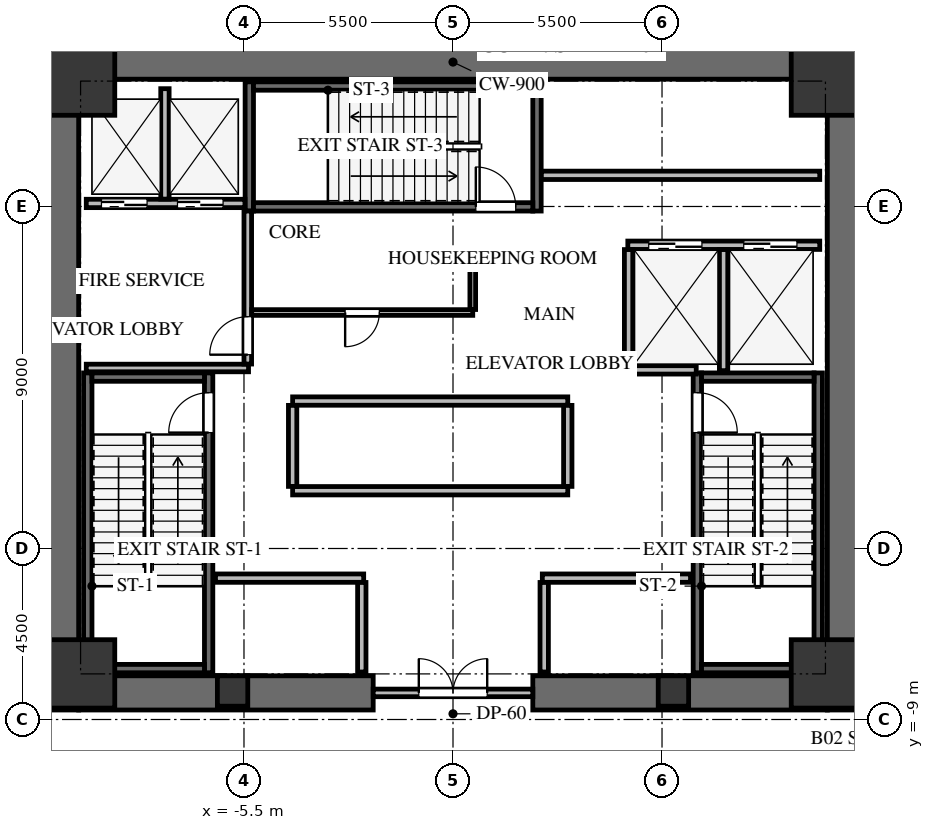
"""IFC4 building model, lengths in metres.
Left out: names, types, materials, properties, quantities, classifications, styles, units other than length and angle.
Written with IfcOpenShell. Run it as: python <this file> out.ifc"""

import sys

from ifc_helpers import new_model, si_unit, direction, frame, frame_2d, origin, origin_2d, place, context, subcontext, project, spatial, rectangle, extrude, source, transform, mapped, element, fill, save


model = new_model("IFC4")
c1 = context("Model", 3, precision=1e-05, world=origin(), true_north=direction((0.0, 1.0)))
c2 = subcontext(c1, "Body", "Model", "MODEL_VIEW")
j1 = project(units=[si_unit("LENGTHUNIT", "METRE"), si_unit("PLANEANGLEUNIT", "RADIAN")], contexts=[c1])
p1 = place(None, origin())
s1 = spatial("IfcSite", under=j1, at=p1, CompositionType="ELEMENT")
p2 = place(p1, origin())
s2 = spatial("IfcBuilding", under=s1, at=p2, CompositionType="ELEMENT")
p3 = place(p2, frame((0.0, 0.0, -10.0)))
s3 = spatial("IfcBuildingStorey", under=s2, at=p3, CompositionType="ELEMENT", Elevation=-10.0)
for number, where, z_axis, x_axis in (
    (1, (-10.3, -8.75, 0.0), (0.0, 0.0, 1.0), (0.0, 1.0, 0.0)),
    (2, (10.3, -8.75, 0.0), (0.0, 0.0, 1.0), (0.0, 1.0, 0.0)),
):
    element("IfcWall", number, at=place(p3, frame(where, z_axis=z_axis, x_axis=x_axis)), inside=s3, PredefinedType="SHEAR", context=c2, shape_type="SweptSolid", body=[
        extrude(rectangle(XDim=17.5, YDim=0.9, at=frame_2d((8.75, 0.0))), origin(), (0.0, 0.0, 1.0), 5.0),
    ])
for number, where, z_axis, x_axis in (
    (3, (-9.85, -8.3, 0.0), (0.0, 0.0, 1.0), (1.0, 0.0, 0.0)),
    (4, (2.1, -8.3, 0.0), (0.0, 0.0, 1.0), (1.0, 0.0, 0.0)),
):
    element("IfcWall", number, at=place(p3, frame(where, z_axis=z_axis, x_axis=x_axis)), inside=s3, PredefinedType="SHEAR", context=c2, shape_type="SweptSolid", body=[
        extrude(rectangle(XDim=7.75, YDim=0.9, at=frame_2d((3.875, 0.0))), origin(), (0.0, 0.0, 1.0), 5.0),
    ])
p4 = place(p3, frame((-9.85, 8.3, 0.0), z_axis=(0.0, 0.0, 1.0), x_axis=(1.0, 0.0, 0.0)))
e5 = element("IfcWall", 5, at=p4, inside=s3, PredefinedType="SHEAR", context=c2, shape_type="SweptSolid", body=[
    extrude(rectangle(XDim=19.7, YDim=0.9, at=frame_2d((9.85, 0.0))), origin(), (0.0, 0.0, 1.0), 5.0),
])
p5 = place(p3, frame((-6.43, -7.77, 0.0), z_axis=(0.0, 0.0, 1.0), x_axis=(0.0, 1.0, 0.0)))
e6 = element("IfcWall", 6, at=p5, inside=s3, PredefinedType="SHEAR", context=c2, shape_type="SweptSolid", body=[
    extrude(rectangle(XDim=7.89, YDim=0.22, at=frame_2d((3.945, 0.0))), origin(), (0.0, 0.0, 1.0), 4.65),
])
p6 = place(p5, frame((6.32, 0.0, 0.0)))
e7 = element("IfcOpeningElement", 7, at=p6, cuts=e6, PredefinedType="OPENING", context=c2, shape_type="SweptSolid", body=[
    extrude(rectangle(XDim=1.05, YDim=2.15, at=frame_2d((0.525, 1.075))), frame((0.0, 0.12, 0.0), z_axis=(0.0, -1.0, 0.0), x_axis=(1.0, 0.0, 0.0)), (0.0, 0.0, 1.0), 0.24),
])
p7 = place(p3, frame((-9.61, 0.12, 0.0), z_axis=(0.0, 0.0, 1.0), x_axis=(0.0, -1.0, 0.0)))
e8 = element("IfcWall", 8, at=p7, inside=s3, PredefinedType="SHEAR", context=c2, shape_type="SweptSolid", body=[
    extrude(rectangle(XDim=7.89, YDim=0.22, at=frame_2d((3.945, 0.0))), origin(), (0.0, 0.0, 1.0), 4.65),
])
for number, where, z_axis, x_axis in (
    (9, (-9.5, -7.66, 0.0), (0.0, 0.0, 1.0), (1.0, 0.0, 0.0)),
    (10, (-6.54, 0.01, 0.0), (0.0, 0.0, 1.0), (-1.0, 0.0, 0.0)),
):
    element("IfcWall", number, at=place(p3, frame(where, z_axis=z_axis, x_axis=x_axis)), inside=s3, PredefinedType="SHEAR", context=c2, shape_type="SweptSolid", body=[
        extrude(rectangle(XDim=2.96, YDim=0.22, at=frame_2d((1.48, 0.0))), origin(), (0.0, 0.0, 1.0), 4.65),
    ])
p8 = place(p3, frame((9.61, -7.77, 0.0), z_axis=(0.0, 0.0, 1.0), x_axis=(0.0, 1.0, 0.0)))
e11 = element("IfcWall", 11, at=p8, inside=s3, PredefinedType="SHEAR", context=c2, shape_type="SweptSolid", body=[
    extrude(rectangle(XDim=7.89, YDim=0.22, at=frame_2d((3.945, 0.0))), origin(), (0.0, 0.0, 1.0), 4.65),
])
p9 = place(p3, frame((6.43, 0.12, 0.0), z_axis=(0.0, 0.0, 1.0), x_axis=(0.0, -1.0, 0.0)))
e12 = element("IfcWall", 12, at=p9, inside=s3, PredefinedType="SHEAR", context=c2, shape_type="SweptSolid", body=[
    extrude(rectangle(XDim=7.89, YDim=0.22, at=frame_2d((3.945, 0.0))), origin(), (0.0, 0.0, 1.0), 4.65),
])
p10 = place(p9, frame((0.52, 0.0, 0.0)))
e13 = element("IfcOpeningElement", 13, at=p10, cuts=e12, PredefinedType="OPENING", context=c2, shape_type="SweptSolid", body=[
    extrude(rectangle(XDim=1.05, YDim=2.15, at=frame_2d((0.525, 1.075))), frame((0.0, 0.12, 0.0), z_axis=(0.0, -1.0, 0.0), x_axis=(1.0, 0.0, 0.0)), (0.0, 0.0, 1.0), 0.24),
])
for number, where, z_axis, x_axis in (
    (14, (6.54, -7.66, 0.0), (0.0, 0.0, 1.0), (1.0, 0.0, 0.0)),
    (15, (9.5, 0.01, 0.0), (0.0, 0.0, 1.0), (-1.0, 0.0, 0.0)),
):
    element("IfcWall", number, at=place(p3, frame(where, z_axis=z_axis, x_axis=x_axis)), inside=s3, PredefinedType="SHEAR", context=c2, shape_type="SweptSolid", body=[
        extrude(rectangle(XDim=2.96, YDim=0.22, at=frame_2d((1.48, 0.0))), origin(), (0.0, 0.0, 1.0), 4.65),
    ])
for number, where, z_axis, x_axis in (
    (16, (2.21, 4.38, 0.0), (0.0, 0.0, 1.0), (0.0, 1.0, 0.0)),
    (17, (-5.36, 7.78, 0.0), (0.0, 0.0, 1.0), (0.0, -1.0, 0.0)),
):
    element("IfcWall", number, at=place(p3, frame(where, z_axis=z_axis, x_axis=x_axis)), inside=s3, PredefinedType="SHEAR", context=c2, shape_type="SweptSolid", body=[
        extrude(rectangle(XDim=3.4, YDim=0.22, at=frame_2d((1.7, 0.0))), origin(), (0.0, 0.0, 1.0), 4.65),
    ])
p11 = place(p3, frame((-5.25, 4.49, 0.0), z_axis=(0.0, 0.0, 1.0), x_axis=(1.0, 0.0, 0.0)))
e18 = element("IfcWall", 18, at=p11, inside=s3, PredefinedType="SHEAR", context=c2, shape_type="SweptSolid", body=[
    extrude(rectangle(XDim=7.35, YDim=0.22, at=frame_2d((3.675, 0.0))), origin(), (0.0, 0.0, 1.0), 4.65),
])
p12 = place(p11, frame((5.85, 0.0, 0.0)))
e19 = element("IfcOpeningElement", 19, at=p12, cuts=e18, PredefinedType="OPENING", context=c2, shape_type="SweptSolid", body=[
    extrude(rectangle(XDim=1.05, YDim=2.15, at=frame_2d((0.525, 1.075))), frame((0.0, 0.12, 0.0), z_axis=(0.0, -1.0, 0.0), x_axis=(1.0, 0.0, 0.0)), (0.0, 0.0, 1.0), 0.24),
])
p13 = place(p3, frame((2.1, 7.67, 0.0), z_axis=(0.0, 0.0, 1.0), x_axis=(-1.0, 0.0, 0.0)))
e20 = element("IfcWall", 20, at=p13, inside=s3, PredefinedType="SHEAR", context=c2, shape_type="SweptSolid", body=[
    extrude(rectangle(XDim=7.35, YDim=0.22, at=frame_2d((3.675, 0.0))), origin(), (0.0, 0.0, 1.0), 4.65),
])
m1 = source(origin(), c2, "Body", "SweptSolid", [
    extrude(rectangle(XDim=1.8, YDim=1.8, at=origin_2d()), origin(), (0.0, 0.0, 1.0), 4.65),
])
for number, where, z_axis, x_axis in (
    (21, (-9.8, -7.8, 0.0), (0.0, 0.0, 1.0), (1.0, 0.0, 0.0)),
    (22, (9.8, -7.8, 0.0), (0.0, 0.0, 1.0), (1.0, 0.0, 0.0)),
    (23, (9.8, 7.8, 0.0), (0.0, 0.0, 1.0), (1.0, 0.0, 0.0)),
    (24, (-9.8, 7.8, 0.0), (0.0, 0.0, 1.0), (1.0, 0.0, 0.0)),
):
    element("IfcColumn", number, at=place(p3, frame(where, z_axis=z_axis, x_axis=x_axis)), inside=s3, PredefinedType="COLUMN", context=c2, shape_type="MappedRepresentation", body=[
        mapped(m1, transform((0.0, 0.0, 0.0), x_axis=(1.0, 0.0, 0.0), y_axis=(0.0, 1.0, 0.0), z_axis=(0.0, 0.0, 1.0), scale=1.0)),
    ])
m2 = source(origin(), c2, "Body", "SweptSolid", [
    extrude(rectangle(XDim=0.8, YDim=0.8, at=origin_2d()), origin(), (0.0, 0.0, 1.0), 4.65),
])
for number, where, z_axis, x_axis in (
    (25, (-5.8, -8.25, 0.0), (0.0, 0.0, 1.0), (1.0, 0.0, 0.0)),
    (26, (5.8, -8.25, 0.0), (0.0, 0.0, 1.0), (1.0, 0.0, 0.0)),
):
    element("IfcColumn", number, at=place(p3, frame(where, z_axis=z_axis, x_axis=x_axis)), inside=s3, PredefinedType="PILASTER", context=c2, shape_type="MappedRepresentation", body=[
        mapped(m2, transform((0.0, 0.0, 0.0), x_axis=(1.0, 0.0, 0.0), y_axis=(0.0, 1.0, 0.0), z_axis=(0.0, 0.0, 1.0), scale=1.0)),
    ])
p14 = place(p3, frame((-2.1, -8.3, 0.0), z_axis=(0.0, 0.0, 1.0), x_axis=(1.0, 0.0, 0.0)))
e27 = element("IfcWall", 27, at=p14, inside=s3, PredefinedType="SOLIDWALL", context=c2, shape_type="SweptSolid", body=[
    extrude(rectangle(XDim=4.2, YDim=0.2, at=frame_2d((2.1, 0.0))), origin(), (0.0, 0.0, 1.0), 4.635),
])
p15 = place(p14, frame((1.2, 0.0, 0.0)))
e28 = element("IfcOpeningElement", 28, at=p15, cuts=e27, PredefinedType="OPENING", context=c2, shape_type="SweptSolid", body=[
    extrude(rectangle(XDim=1.8, YDim=2.15, at=frame_2d((0.9, 1.075))), frame((0.0, 0.11, 0.0), z_axis=(0.0, -1.0, 0.0), x_axis=(1.0, 0.0, 0.0)), (0.0, 0.0, 1.0), 0.22),
])
p16 = place(p3, frame((-9.65, 4.58, 0.0), z_axis=(0.0, 0.0, 1.0), x_axis=(1.0, 0.0, 0.0)))
e29 = element("IfcWall", 29, at=p16, inside=s3, PredefinedType="SOLIDWALL", context=c2, shape_type="SweptSolid", body=[
    extrude(rectangle(XDim=4.175, YDim=0.22, at=frame_2d((2.087, 0.0))), origin(), (0.0, 0.0, 1.0), 4.635),
])
p17 = place(p16, frame((0.4, 0.0, 0.0)))
e30 = element("IfcOpeningElement", 30, at=p17, cuts=e29, PredefinedType="OPENING", context=c2, shape_type="SweptSolid", body=[
    extrude(rectangle(XDim=1.2, YDim=2.15, at=frame_2d((0.6, 1.075))), frame((0.0, 0.12, 0.0), z_axis=(0.0, -1.0, 0.0), x_axis=(1.0, 0.0, 0.0)), (0.0, 0.0, 1.0), 0.24),
])
p18 = place(p16, frame((2.4, 0.0, 0.0)))
e31 = element("IfcOpeningElement", 31, at=p18, cuts=e29, PredefinedType="OPENING", context=c2, shape_type="SweptSolid", body=[
    extrude(rectangle(XDim=1.2, YDim=2.15, at=frame_2d((0.6, 1.075))), frame((0.0, 0.12, 0.0), z_axis=(0.0, -1.0, 0.0), x_axis=(1.0, 0.0, 0.0)), (0.0, 0.0, 1.0), 0.24),
])
p19 = place(p3, frame((-7.58, 4.694, 0.0), z_axis=(0.0, 0.0, 1.0), x_axis=(0.0, 1.0, 0.0)))
e32 = element("IfcWall", 32, at=p19, inside=s3, PredefinedType="SOLIDWALL", context=c2, shape_type="SweptSolid", body=[
    extrude(rectangle(XDim=2.906, YDim=0.22, at=frame_2d((1.453, 0.0))), origin(), (0.0, 0.0, 1.0), 4.635),
])
p20 = place(p3, frame((-9.65, 0.25, 0.0), z_axis=(0.0, 0.0, 1.0), x_axis=(1.0, 0.0, 0.0)))
e33 = element("IfcWall", 33, at=p20, inside=s3, PredefinedType="SOLIDWALL", context=c2, shape_type="SweptSolid", body=[
    extrude(rectangle(XDim=4.27, YDim=0.2, at=frame_2d((2.135, 0.0))), origin(), (0.0, 0.0, 1.0), 4.635),
])
p21 = place(p3, frame((-5.4, 0.354, 0.0), z_axis=(0.0, 0.0, 1.0), x_axis=(0.0, 1.0, 0.0)))
e34 = element("IfcWall", 34, at=p21, inside=s3, PredefinedType="SOLIDWALL", context=c2, shape_type="SweptSolid", body=[
    extrude(rectangle(XDim=4.026, YDim=0.2, at=frame_2d((2.013, 0.0))), origin(), (0.0, 0.0, 1.0), 4.635),
])
p22 = place(p21, frame((0.246, 0.0, 0.0)))
e35 = element("IfcOpeningElement", 35, at=p22, cuts=e34, PredefinedType="OPENING", context=c2, shape_type="SweptSolid", body=[
    extrude(rectangle(XDim=1.0, YDim=2.15, at=frame_2d((0.5, 1.075))), frame((0.0, 0.11, 0.0), z_axis=(0.0, -1.0, 0.0), x_axis=(1.0, 0.0, 0.0)), (0.0, 0.0, 1.0), 0.22),
])
p23 = place(p3, frame((4.6, 3.48, 0.0), z_axis=(0.0, 0.0, 1.0), x_axis=(1.0, 0.0, 0.0)))
e36 = element("IfcWall", 36, at=p23, inside=s3, PredefinedType="SOLIDWALL", context=c2, shape_type="SweptSolid", body=[
    extrude(rectangle(XDim=5.05, YDim=0.22, at=frame_2d((2.525, 0.0))), origin(), (0.0, 0.0, 1.0), 4.635),
])
p24 = place(p23, frame((0.55, 0.0, 0.0)))
e37 = element("IfcOpeningElement", 37, at=p24, cuts=e36, PredefinedType="OPENING", context=c2, shape_type="SweptSolid", body=[
    extrude(rectangle(XDim=1.4, YDim=2.15, at=frame_2d((0.7, 1.075))), frame((0.0, 0.12, 0.0), z_axis=(0.0, -1.0, 0.0), x_axis=(1.0, 0.0, 0.0)), (0.0, 0.0, 1.0), 0.24),
])
p25 = place(p23, frame((3.05, 0.0, 0.0)))
e38 = element("IfcOpeningElement", 38, at=p25, cuts=e36, PredefinedType="OPENING", context=c2, shape_type="SweptSolid", body=[
    extrude(rectangle(XDim=1.4, YDim=2.15, at=frame_2d((0.7, 1.075))), frame((0.0, 0.12, 0.0), z_axis=(0.0, -1.0, 0.0), x_axis=(1.0, 0.0, 0.0)), (0.0, 0.0, 1.0), 0.24),
])
for number, where, z_axis, x_axis in (
    (39, (4.62, 0.18, 0.0), (0.0, 0.0, 1.0), (0.0, 1.0, 0.0)),
    (40, (7.12, 0.18, 0.0), (0.0, 0.0, 1.0), (0.0, 1.0, 0.0)),
):
    element("IfcWall", number, at=place(p3, frame(where, z_axis=z_axis, x_axis=x_axis)), inside=s3, PredefinedType="SOLIDWALL", context=c2, shape_type="SweptSolid", body=[
        extrude(rectangle(XDim=3.186, YDim=0.22, at=frame_2d((1.593, 0.0))), origin(), (0.0, 0.0, 1.0), 4.635),
    ])
p26 = place(p3, frame((4.734, 0.2, 0.0), z_axis=(0.0, 0.0, 1.0), x_axis=(1.0, 0.0, 0.0)))
e41 = element("IfcWall", 41, at=p26, inside=s3, PredefinedType="SOLIDWALL", context=c2, shape_type="SweptSolid", body=[
    extrude(rectangle(XDim=1.666, YDim=0.22, at=frame_2d((0.833, 0.0))), origin(), (0.0, 0.0, 1.0), 4.635),
])
for number, where, z_axis, x_axis in (
    (42, (-6.25, -5.28, 0.0), (0.0, 0.0, 1.0), (1.0, 0.0, 0.0)),
    (43, (2.35, -5.28, 0.0), (0.0, 0.0, 1.0), (1.0, 0.0, 0.0)),
):
    element("IfcWall", number, at=place(p3, frame(where, z_axis=z_axis, x_axis=x_axis)), inside=s3, PredefinedType="SOLIDWALL", context=c2, shape_type="SweptSolid", body=[
        extrude(rectangle(XDim=3.9, YDim=0.22, at=frame_2d((1.95, 0.0))), origin(), (0.0, 0.0, 1.0), 4.635),
    ])
for number, where, z_axis, x_axis in (
    (44, (-2.4, -7.75, 0.0), (0.0, 0.0, 1.0), (0.0, 1.0, 0.0)),
    (45, (2.4, -7.75, 0.0), (0.0, 0.0, 1.0), (0.0, 1.0, 0.0)),
):
    element("IfcWall", number, at=place(p3, frame(where, z_axis=z_axis, x_axis=x_axis)), inside=s3, PredefinedType="SOLIDWALL", context=c2, shape_type="SweptSolid", body=[
        extrude(rectangle(XDim=2.356, YDim=0.22, at=frame_2d((1.178, 0.0))), origin(), (0.0, 0.0, 1.0), 4.635),
    ])
for number, where, z_axis, x_axis in (
    (46, (-4.22, -2.98, 0.0), (0.0, 0.0, 1.0), (1.0, 0.0, 0.0)),
    (47, (-4.22, -0.62, 0.0), (0.0, 0.0, 1.0), (1.0, 0.0, 0.0)),
):
    element("IfcWall", number, at=place(p3, frame(where, z_axis=z_axis, x_axis=x_axis)), inside=s3, PredefinedType="SOLIDWALL", context=c2, shape_type="SweptSolid", body=[
        extrude(rectangle(XDim=7.24, YDim=0.22, at=frame_2d((3.62, 0.0))), origin(), (0.0, 0.0, 1.0), 4.635),
    ])
for number, where, z_axis, x_axis in (
    (48, (-4.22, -2.866, 0.0), (0.0, 0.0, 1.0), (0.0, 1.0, 0.0)),
    (49, (3.02, -2.866, 0.0), (0.0, 0.0, 1.0), (0.0, 1.0, 0.0)),
):
    element("IfcWall", number, at=place(p3, frame(where, z_axis=z_axis, x_axis=x_axis)), inside=s3, PredefinedType="SOLIDWALL", context=c2, shape_type="SweptSolid", body=[
        extrude(rectangle(XDim=2.132, YDim=0.22, at=frame_2d((1.066, 0.0))), origin(), (0.0, 0.0, 1.0), 4.635),
    ])
p27 = place(p3, frame((2.325, 5.32, 0.0), z_axis=(0.0, 0.0, 1.0), x_axis=(1.0, 0.0, 0.0)))
e50 = element("IfcWall", 50, at=p27, inside=s3, PredefinedType="SOLIDWALL", context=c2, shape_type="SweptSolid", body=[
    extrude(rectangle(XDim=7.325, YDim=0.22, at=frame_2d((3.663, 0.0))), origin(), (0.0, 0.0, 1.0), 4.635),
])
p28 = place(p3, frame((0.52, 1.71, 0.0), z_axis=(0.0, 0.0, 1.0), x_axis=(-1.0, 0.0, 0.0)))
e51 = element("IfcWall", 51, at=p28, inside=s3, PredefinedType="PARTITIONING", context=c2, shape_type="SweptSolid", body=[
    extrude(rectangle(XDim=5.816, YDim=0.15, at=frame_2d((2.908, 0.0))), origin(), (0.0, 0.0, 1.0), 4.635),
])
p29 = place(p28, frame((2.458, 0.0, 0.0)))
e52 = element("IfcOpeningElement", 52, at=p29, cuts=e51, PredefinedType="OPENING", context=c2, shape_type="SweptSolid", body=[
    extrude(rectangle(XDim=0.9, YDim=2.05, at=frame_2d((0.45, 1.025))), frame((0.0, 0.085, 0.0), z_axis=(0.0, -1.0, 0.0), x_axis=(1.0, 0.0, 0.0)), (0.0, 0.0, 1.0), 0.17),
])
p30 = place(p3, frame((0.52, 3.3, 0.0), z_axis=(0.0, 0.0, 1.0), x_axis=(0.0, -1.0, 0.0)))
e53 = element("IfcWall", 53, at=p30, inside=s3, PredefinedType="PARTITIONING", context=c2, shape_type="SweptSolid", body=[
    extrude(rectangle(XDim=1.511, YDim=0.15, at=frame_2d((0.755, 0.0))), origin(), (0.0, 0.0, 1.0), 4.635),
])
m3 = source(origin(), c2, "Body", "SweptSolid", [
    extrude(rectangle(XDim=1.05, YDim=2.15, at=frame_2d((0.525, 1.075))), frame((0.0, 0.025, 0.0), z_axis=(0.0, -1.0, 0.0), x_axis=(1.0, 0.0, 0.0)), (0.0, 0.0, 1.0), 0.05),
])
p31 = place(p6, origin())
e54 = element("IfcDoor", 54, at=p31, inside=s3, OperationType="SINGLE_SWING_LEFT", PredefinedType="DOOR", context=c2, shape_type="MappedRepresentation", body=[
    mapped(m3, transform((0.0, 0.0, 0.0), x_axis=(1.0, 0.0, 0.0), y_axis=(0.0, 1.0, 0.0), z_axis=(0.0, 0.0, 1.0), scale=1.0)),
])
fill(e7, e54)
m4 = source(origin(), c2, "Body", "SweptSolid", [
    extrude(rectangle(XDim=1.05, YDim=2.15, at=frame_2d((0.525, 1.075))), frame((0.0, 0.025, 0.0), z_axis=(0.0, -1.0, 0.0), x_axis=(1.0, 0.0, 0.0)), (0.0, 0.0, 1.0), 0.05),
])
p32 = place(p10, origin())
e55 = element("IfcDoor", 55, at=p32, inside=s3, OperationType="SINGLE_SWING_RIGHT", PredefinedType="DOOR", context=c2, shape_type="MappedRepresentation", body=[
    mapped(m4, transform((0.0, 0.0, 0.0), x_axis=(1.0, 0.0, 0.0), y_axis=(0.0, 1.0, 0.0), z_axis=(0.0, 0.0, 1.0), scale=1.0)),
])
fill(e13, e55)
p33 = place(p12, origin())
e56 = element("IfcDoor", 56, at=p33, inside=s3, OperationType="SINGLE_SWING_LEFT", PredefinedType="DOOR", context=c2, shape_type="MappedRepresentation", body=[
    mapped(m3, transform((0.0, 0.0, 0.0), x_axis=(1.0, 0.0, 0.0), y_axis=(0.0, 1.0, 0.0), z_axis=(0.0, 0.0, 1.0), scale=1.0)),
])
fill(e19, e56)
m5 = source(origin(), c2, "Body", "SweptSolid", [
    extrude(rectangle(XDim=1.8, YDim=2.15, at=frame_2d((0.9, 1.075))), frame((0.0, 0.025, 0.0), z_axis=(0.0, -1.0, 0.0), x_axis=(1.0, 0.0, 0.0)), (0.0, 0.0, 1.0), 0.05),
])
p34 = place(p15, origin())
e57 = element("IfcDoor", 57, at=p34, inside=s3, OperationType="DOUBLE_DOOR_SINGLE_SWING", PredefinedType="DOOR", context=c2, shape_type="MappedRepresentation", body=[
    mapped(m5, transform((0.0, 0.0, 0.0), x_axis=(1.0, 0.0, 0.0), y_axis=(0.0, 1.0, 0.0), z_axis=(0.0, 0.0, 1.0), scale=1.0)),
])
fill(e28, e57)
m6 = source(origin(), c2, "Body", "SweptSolid", [
    extrude(rectangle(XDim=1.2, YDim=2.15, at=frame_2d((0.6, 1.075))), frame((0.0, 0.025, 0.0), z_axis=(0.0, -1.0, 0.0), x_axis=(1.0, 0.0, 0.0)), (0.0, 0.0, 1.0), 0.05),
])
p35 = place(p17, origin())
e58 = element("IfcDoor", 58, at=p35, inside=s3, OperationType="DOUBLE_DOOR_SLIDING", PredefinedType="DOOR", context=c2, shape_type="MappedRepresentation", body=[
    mapped(m6, transform((0.0, 0.0, 0.0), x_axis=(1.0, 0.0, 0.0), y_axis=(0.0, 1.0, 0.0), z_axis=(0.0, 0.0, 1.0), scale=1.0)),
])
fill(e30, e58)
p36 = place(p18, origin())
e59 = element("IfcDoor", 59, at=p36, inside=s3, OperationType="DOUBLE_DOOR_SLIDING", PredefinedType="DOOR", context=c2, shape_type="MappedRepresentation", body=[
    mapped(m6, transform((0.0, 0.0, 0.0), x_axis=(1.0, 0.0, 0.0), y_axis=(0.0, 1.0, 0.0), z_axis=(0.0, 0.0, 1.0), scale=1.0)),
])
fill(e31, e59)
m7 = source(origin(), c2, "Body", "SweptSolid", [
    extrude(rectangle(XDim=1.0, YDim=2.15, at=frame_2d((0.5, 1.075))), frame((0.0, 0.025, 0.0), z_axis=(0.0, -1.0, 0.0), x_axis=(1.0, 0.0, 0.0)), (0.0, 0.0, 1.0), 0.05),
])
p37 = place(p22, origin())
e60 = element("IfcDoor", 60, at=p37, inside=s3, OperationType="SINGLE_SWING_LEFT", PredefinedType="DOOR", context=c2, shape_type="MappedRepresentation", body=[
    mapped(m7, transform((0.0, 0.0, 0.0), x_axis=(1.0, 0.0, 0.0), y_axis=(0.0, 1.0, 0.0), z_axis=(0.0, 0.0, 1.0), scale=1.0)),
])
fill(e35, e60)
m8 = source(origin(), c2, "Body", "SweptSolid", [
    extrude(rectangle(XDim=1.4, YDim=2.15, at=frame_2d((0.7, 1.075))), frame((0.0, 0.025, 0.0), z_axis=(0.0, -1.0, 0.0), x_axis=(1.0, 0.0, 0.0)), (0.0, 0.0, 1.0), 0.05),
])
p38 = place(p24, origin())
e61 = element("IfcDoor", 61, at=p38, inside=s3, OperationType="DOUBLE_DOOR_SLIDING", PredefinedType="DOOR", context=c2, shape_type="MappedRepresentation", body=[
    mapped(m8, transform((0.0, 0.0, 0.0), x_axis=(1.0, 0.0, 0.0), y_axis=(0.0, 1.0, 0.0), z_axis=(0.0, 0.0, 1.0), scale=1.0)),
])
fill(e37, e61)
p39 = place(p25, origin())
e62 = element("IfcDoor", 62, at=p39, inside=s3, OperationType="DOUBLE_DOOR_SLIDING", PredefinedType="DOOR", context=c2, shape_type="MappedRepresentation", body=[
    mapped(m8, transform((0.0, 0.0, 0.0), x_axis=(1.0, 0.0, 0.0), y_axis=(0.0, 1.0, 0.0), z_axis=(0.0, 0.0, 1.0), scale=1.0)),
])
fill(e38, e62)
m9 = source(origin(), c2, "Body", "SweptSolid", [
    extrude(rectangle(XDim=0.9, YDim=2.05, at=frame_2d((0.45, 1.025))), frame((0.0, 0.025, 0.0), z_axis=(0.0, -1.0, 0.0), x_axis=(1.0, 0.0, 0.0)), (0.0, 0.0, 1.0), 0.05),
])
p40 = place(p29, origin())
e63 = element("IfcDoor", 63, at=p40, inside=s3, OperationType="SINGLE_SWING_RIGHT", PredefinedType="DOOR", context=c2, shape_type="MappedRepresentation", body=[
    mapped(m9, transform((0.0, 0.0, 0.0), x_axis=(1.0, 0.0, 0.0), y_axis=(0.0, 1.0, 0.0), z_axis=(0.0, 0.0, 1.0), scale=1.0)),
])
fill(e52, e63)
save(model, sys.argv[1])
